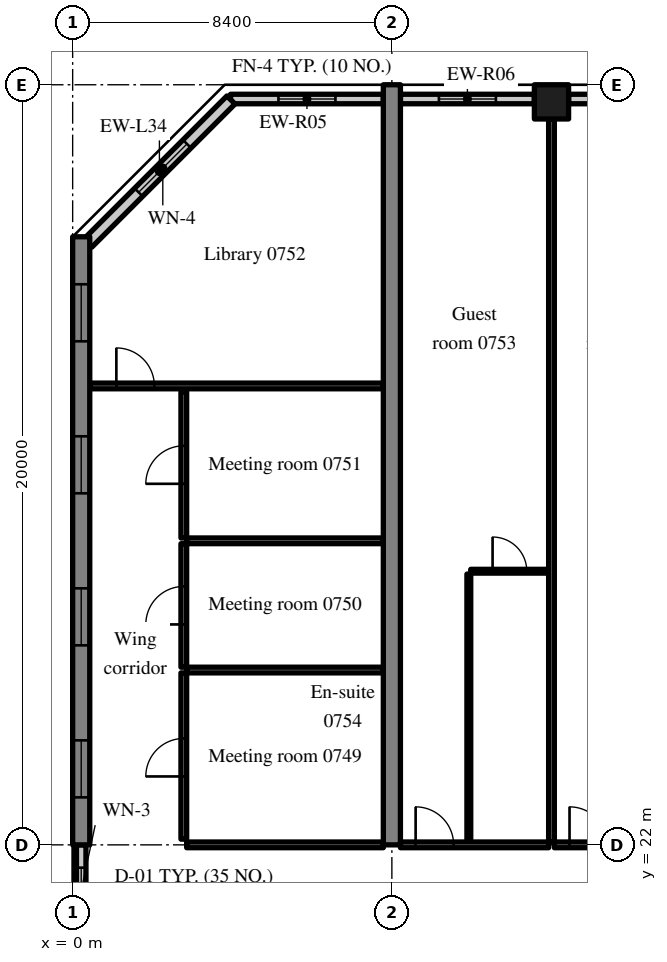
"""IFC4 building model, lengths in metres.
Left out: names, types, materials, properties, quantities, classifications, styles, units other than length and angle.
Written with IfcOpenShell. Run it as: python <this file> out.ifc"""

import sys

from ifc_helpers import new_model, si_unit, direction, frame, frame_2d, origin, origin_2d, place, context, subcontext, project, spatial, rectangle, extrude, source, transform, mapped, element, fill, save


model = new_model("IFC4")
c1 = context("Model", 3, precision=1e-05, world=origin(), true_north=direction((0.0, 1.0)))
c2 = subcontext(c1, "Body", "Model", "MODEL_VIEW")
j1 = project(units=[si_unit("LENGTHUNIT", "METRE"), si_unit("PLANEANGLEUNIT", "RADIAN")], contexts=[c1])
p1 = place(None, origin())
s1 = spatial("IfcSite", under=j1, at=p1, CompositionType="ELEMENT")
p2 = place(p1, origin())
s2 = spatial("IfcBuilding", under=s1, at=p2, CompositionType="ELEMENT")
p3 = place(p2, frame((0.0, 0.0, 35.4)))
s3 = spatial("IfcBuildingStorey", under=s2, at=p3, CompositionType="ELEMENT", Elevation=35.4)
m1 = source(origin(), c2, "Body", "SweptSolid", [
    extrude(rectangle(XDim=16.0, YDim=0.45, at=frame_2d((8.0, 0.0))), origin(), (0.0, 0.0, 1.0), 3.52),
])
p4 = place(p3, frame((0.225, 22.0, 0.0), z_axis=(0.0, 0.0, 1.0), x_axis=(0.0, 1.0, 0.0)))
e1 = element("IfcWall", 1, at=p4, inside=s3, PredefinedType="SHEAR", context=c2, shape_type="MappedRepresentation", body=[
    mapped(m1, transform((0.0, 0.0, 0.0), scale=1.0)),
])
m2 = source(origin(), c2, "Body", "SweptSolid", [
    extrude(rectangle(XDim=1.5, YDim=1.5, at=frame_2d((0.75, 0.75))), frame((0.0, 0.235, 0.0), z_axis=(0.0, -1.0, 0.0), x_axis=(1.0, 0.0, 0.0)), (0.0, 0.0, 1.0), 0.47),
])
p5 = place(p4, frame((1.25, 0.0, 0.9)))
e2 = element("IfcOpeningElement", 2, at=p5, cuts=e1, PredefinedType="OPENING", context=c2, shape_type="MappedRepresentation", body=[
    mapped(m2, transform((0.0, 0.0, 0.0), scale=1.0)),
])
p6 = place(p4, frame((5.25, 0.0, 0.9)))
e3 = element("IfcOpeningElement", 3, at=p6, cuts=e1, PredefinedType="OPENING", context=c2, shape_type="MappedRepresentation", body=[
    mapped(m2, transform((0.0, 0.0, 0.0), scale=1.0)),
])
p7 = place(p4, frame((9.25, 0.0, 0.9)))
e4 = element("IfcOpeningElement", 4, at=p7, cuts=e1, PredefinedType="OPENING", context=c2, shape_type="MappedRepresentation", body=[
    mapped(m2, transform((0.0, 0.0, 0.0), scale=1.0)),
])
p8 = place(p4, frame((13.25, 0.0, 0.9)))
e5 = element("IfcOpeningElement", 5, at=p8, cuts=e1, PredefinedType="OPENING", context=c2, shape_type="MappedRepresentation", body=[
    mapped(m2, transform((0.0, 0.0, 0.0), scale=1.0)),
])
m3 = source(origin(), c2, "Body", "SweptSolid", [
    extrude(rectangle(XDim=20.0, YDim=0.45, at=frame_2d((10.0, 0.0))), origin(), (0.0, 0.0, 1.0), 3.52),
])
p9 = place(p3, frame((8.4, 22.0, 0.0), z_axis=(0.0, 0.0, 1.0), x_axis=(0.0, 1.0, 0.0)))
e6 = element("IfcWall", 6, at=p9, inside=s3, PredefinedType="SHEAR", context=c2, shape_type="MappedRepresentation", body=[
    mapped(m3, transform((0.0, 0.0, 0.0), scale=1.0)),
])
m4 = source(origin(), c2, "Body", "SweptSolid", [
    extrude(rectangle(XDim=0.9, YDim=0.9, at=origin_2d()), origin(), (0.0, 0.0, 1.0), 3.52),
])
p10 = place(p3, frame((12.6, 41.55, 0.0), z_axis=(0.0, 0.0, 1.0), x_axis=(1.0, 0.0, 0.0)))
e7 = element("IfcColumn", 7, at=p10, inside=s3, PredefinedType="COLUMN", context=c2, shape_type="MappedRepresentation", body=[
    mapped(m4, transform((0.0, 0.0, 0.0), scale=1.0)),
])
m5 = source(origin(), c2, "Body", "SweptSolid", [
    extrude(rectangle(XDim=4.02, YDim=0.25, at=frame_2d((2.01, 0.0))), origin(), (0.0, 0.0, 1.0), 2.77),
])
p11 = place(p3, frame((8.175, 41.625, 0.0), z_axis=(0.0, 0.0, 1.0), x_axis=(-1.0, 0.0, 0.0)))
e8 = element("IfcWall", 8, at=p11, inside=s3, PredefinedType="SOLIDWALL", context=c2, shape_type="MappedRepresentation", body=[
    mapped(m5, transform((0.0, 0.0, 0.0), scale=1.0)),
])
m6 = source(origin(), c2, "Body", "SweptSolid", [
    extrude(rectangle(XDim=1.5, YDim=1.5, at=frame_2d((0.75, 0.75))), frame((0.0, 0.135, 0.0), z_axis=(0.0, -1.0, 0.0), x_axis=(1.0, 0.0, 0.0)), (0.0, 0.0, 1.0), 0.27),
])
p12 = place(p11, frame((1.26, 0.0, 0.9)))
e9 = element("IfcOpeningElement", 9, at=p12, cuts=e8, PredefinedType="OPENING", context=c2, shape_type="MappedRepresentation", body=[
    mapped(m6, transform((0.0, 0.0, 0.0), scale=1.0)),
])
m7 = source(origin(), c2, "Body", "SweptSolid", [
    extrude(rectangle(XDim=3.525, YDim=0.25, at=frame_2d((1.762, 0.0))), origin(), (0.0, 0.0, 1.0), 2.77),
])
p13 = place(p3, frame((12.15, 41.625, 0.0), z_axis=(0.0, 0.0, 1.0), x_axis=(-1.0, 0.0, 0.0)))
e10 = element("IfcWall", 10, at=p13, inside=s3, PredefinedType="SOLIDWALL", context=c2, shape_type="MappedRepresentation", body=[
    mapped(m7, transform((0.0, 0.0, 0.0), scale=1.0)),
])
p14 = place(p13, frame((1.012, 0.0, 0.9)))
e11 = element("IfcOpeningElement", 11, at=p14, cuts=e10, PredefinedType="OPENING", context=c2, shape_type="MappedRepresentation", body=[
    mapped(m6, transform((0.0, 0.0, 0.0), scale=1.0)),
])
p15 = place(p3, frame((16.575, 41.625, 0.0), z_axis=(0.0, 0.0, 1.0), x_axis=(-1.0, 0.0, 0.0)))
e12 = element("IfcWall", 12, at=p15, inside=s3, PredefinedType="SOLIDWALL", context=c2, shape_type="MappedRepresentation", body=[
    mapped(m7, transform((0.0, 0.0, 0.0), scale=1.0)),
])
p16 = place(p15, frame((1.012, 0.0, 0.9)))
e13 = element("IfcOpeningElement", 13, at=p16, cuts=e12, PredefinedType="OPENING", context=c2, shape_type="MappedRepresentation", body=[
    mapped(m6, transform((0.0, 0.0, 0.0), scale=1.0)),
])
m8 = source(origin(), c2, "Body", "SweptSolid", [
    extrude(rectangle(XDim=5.326, YDim=0.3, at=frame_2d((2.663, 0.0))), origin(), (0.0, 0.0, 1.0), 3.52),
])
p17 = place(p3, frame((4.166, 41.6, 0.0), z_axis=(0.0, 0.0, 1.0), x_axis=(-0.707106781187, -0.707106781187, 0.0)))
e14 = element("IfcWall", 14, at=p17, inside=s3, PredefinedType="SOLIDWALL", context=c2, shape_type="MappedRepresentation", body=[
    mapped(m8, transform((0.0, 0.0, 0.0), scale=1.0)),
])
m9 = source(origin(), c2, "Body", "SweptSolid", [
    extrude(rectangle(XDim=1.8, YDim=1.5, at=frame_2d((0.9, 0.75))), frame((0.0, 0.16, 0.0), z_axis=(0.0, -1.0, 0.0), x_axis=(1.0, 0.0, 0.0)), (0.0, 0.0, 1.0), 0.32),
])
p18 = place(p17, frame((1.636, 0.0, 0.9)))
e15 = element("IfcOpeningElement", 15, at=p18, cuts=e14, PredefinedType="OPENING", context=c2, shape_type="MappedRepresentation", body=[
    mapped(m9, transform((0.0, 0.0, 0.0), scale=1.0)),
])
m10 = source(origin(), c2, "Body", "SweptSolid", [
    extrude(rectangle(XDim=2.4, YDim=0.25, at=frame_2d((1.2, 0.0))), origin(), (0.0, 0.0, 1.0), 2.62),
])
p19 = place(p3, frame((0.225, 19.6, 0.0), z_axis=(0.0, 0.0, 1.0), x_axis=(0.0, 1.0, 0.0)))
e16 = element("IfcWall", 16, at=p19, inside=s3, PredefinedType="SOLIDWALL", context=c2, shape_type="MappedRepresentation", body=[
    mapped(m10, transform((0.0, 0.0, 0.0), scale=1.0)),
])
m11 = source(origin(), c2, "Body", "SweptSolid", [
    extrude(rectangle(XDim=1.2, YDim=1.5, at=frame_2d((0.6, 0.75))), frame((0.0, 0.135, 0.0), z_axis=(0.0, -1.0, 0.0), x_axis=(1.0, 0.0, 0.0)), (0.0, 0.0, 1.0), 0.27),
])
p20 = place(p19, frame((0.6, 0.0, 0.9)))
e17 = element("IfcOpeningElement", 17, at=p20, cuts=e16, PredefinedType="OPENING", context=c2, shape_type="MappedRepresentation", body=[
    mapped(m11, transform((0.0, 0.0, 0.0), scale=1.0)),
])
m12 = source(origin(), c2, "Body", "SweptSolid", [
    extrude(rectangle(XDim=5.175, YDim=0.15, at=frame_2d((2.587, 0.0))), origin(), (0.0, 0.0, 1.0), 2.82),
])
p21 = place(p3, frame((3.0, 22.0, 0.0), z_axis=(0.0, 0.0, 1.0), x_axis=(1.0, 0.0, 0.0)))
e18 = element("IfcWall", 18, at=p21, inside=s3, PredefinedType="PARTITIONING", context=c2, shape_type="MappedRepresentation", body=[
    mapped(m12, transform((0.0, 0.0, 0.0), scale=1.0)),
])
m13 = source(origin(), c2, "Body", "SweptSolid", [
    extrude(rectangle(XDim=4.375, YDim=0.15, at=frame_2d((2.188, 0.0))), origin(), (0.0, 0.0, 1.0), 3.52),
])
p22 = place(p3, frame((2.925, 22.15, 0.0), z_axis=(0.0, 0.0, 1.0), x_axis=(0.0, 1.0, 0.0)))
e19 = element("IfcWall", 19, at=p22, inside=s3, PredefinedType="PARTITIONING", context=c2, shape_type="MappedRepresentation", body=[
    mapped(m13, transform((0.0, 0.0, 0.0), scale=1.0)),
])
m14 = source(origin(), c2, "Body", "SweptSolid", [
    extrude(rectangle(XDim=1.0, YDim=2.1, at=frame_2d((0.5, 1.05))), frame((0.0, 0.085, 0.0), z_axis=(0.0, -1.0, 0.0), x_axis=(1.0, 0.0, 0.0)), (0.0, 0.0, 1.0), 0.17),
])
p23 = place(p22, frame((1.65, 0.0, 0.0)))
e20 = element("IfcOpeningElement", 20, at=p23, cuts=e19, PredefinedType="OPENING", context=c2, shape_type="MappedRepresentation", body=[
    mapped(m14, transform((0.0, 0.0, 0.0), scale=1.0)),
])
m15 = source(origin(), c2, "Body", "SweptSolid", [
    extrude(rectangle(XDim=5.175, YDim=0.15, at=frame_2d((2.587, 0.0))), origin(), (0.0, 0.0, 1.0), 3.52),
])
p24 = place(p3, frame((3.0, 26.6, 0.0), z_axis=(0.0, 0.0, 1.0), x_axis=(1.0, 0.0, 0.0)))
e21 = element("IfcWall", 21, at=p24, inside=s3, PredefinedType="PARTITIONING", context=c2, shape_type="MappedRepresentation", body=[
    mapped(m15, transform((0.0, 0.0, 0.0), scale=1.0)),
])
m16 = source(origin(), c2, "Body", "SweptSolid", [
    extrude(rectangle(XDim=3.25, YDim=0.15, at=frame_2d((1.625, 0.0))), origin(), (0.0, 0.0, 1.0), 3.52),
])
p25 = place(p3, frame((2.925, 26.675, 0.0), z_axis=(0.0, 0.0, 1.0), x_axis=(0.0, 1.0, 0.0)))
e22 = element("IfcWall", 22, at=p25, inside=s3, PredefinedType="PARTITIONING", context=c2, shape_type="MappedRepresentation", body=[
    mapped(m16, transform((0.0, 0.0, 0.0), scale=1.0)),
])
p26 = place(p25, frame((1.125, 0.0, 0.0)))
e23 = element("IfcOpeningElement", 23, at=p26, cuts=e22, PredefinedType="OPENING", context=c2, shape_type="MappedRepresentation", body=[
    mapped(m14, transform((0.0, 0.0, 0.0), scale=1.0)),
])
p27 = place(p3, frame((3.0, 30.0, 0.0), z_axis=(0.0, 0.0, 1.0), x_axis=(1.0, 0.0, 0.0)))
e24 = element("IfcWall", 24, at=p27, inside=s3, PredefinedType="PARTITIONING", context=c2, shape_type="MappedRepresentation", body=[
    mapped(m15, transform((0.0, 0.0, 0.0), scale=1.0)),
])
m17 = source(origin(), c2, "Body", "SweptSolid", [
    extrude(rectangle(XDim=3.85, YDim=0.15, at=frame_2d((1.925, 0.0))), origin(), (0.0, 0.0, 1.0), 3.52),
])
p28 = place(p3, frame((2.925, 30.075, 0.0), z_axis=(0.0, 0.0, 1.0), x_axis=(0.0, 1.0, 0.0)))
e25 = element("IfcWall", 25, at=p28, inside=s3, PredefinedType="PARTITIONING", context=c2, shape_type="MappedRepresentation", body=[
    mapped(m17, transform((0.0, 0.0, 0.0), scale=1.0)),
])
p29 = place(p28, frame((1.425, 0.0, 0.0)))
e26 = element("IfcOpeningElement", 26, at=p29, cuts=e25, PredefinedType="OPENING", context=c2, shape_type="MappedRepresentation", body=[
    mapped(m14, transform((0.0, 0.0, 0.0), scale=1.0)),
])
m18 = source(origin(), c2, "Body", "SweptSolid", [
    extrude(rectangle(XDim=7.725, YDim=0.15, at=frame_2d((3.863, 0.0))), origin(), (0.0, 0.0, 1.0), 3.52),
])
p30 = place(p3, frame((0.45, 34.075, 0.0), z_axis=(0.0, 0.0, 1.0), x_axis=(1.0, 0.0, 0.0)))
e27 = element("IfcWall", 27, at=p30, inside=s3, PredefinedType="PARTITIONING", context=c2, shape_type="MappedRepresentation", body=[
    mapped(m18, transform((0.0, 0.0, 0.0), scale=1.0)),
])
p31 = place(p30, frame((0.7, 0.0, 0.0)))
e28 = element("IfcOpeningElement", 28, at=p31, cuts=e27, PredefinedType="OPENING", context=c2, shape_type="MappedRepresentation", body=[
    mapped(m14, transform((0.0, 0.0, 0.0), scale=1.0)),
])
m19 = source(origin(), c2, "Body", "SweptSolid", [
    extrude(rectangle(XDim=7.05, YDim=0.1, at=frame_2d((3.525, 0.0))), origin(), (0.0, 0.0, 1.0), 3.52),
])
p32 = place(p3, frame((10.425, 22.075, 0.0), z_axis=(0.0, 0.0, 1.0), x_axis=(0.0, 1.0, 0.0)))
e29 = element("IfcWall", 29, at=p32, inside=s3, PredefinedType="PARTITIONING", context=c2, shape_type="MappedRepresentation", body=[
    mapped(m19, transform((0.0, 0.0, 0.0), scale=1.0)),
])
m20 = source(origin(), c2, "Body", "SweptSolid", [
    extrude(rectangle(XDim=2.05, YDim=0.1, at=frame_2d((1.025, 0.0))), origin(), (0.0, 0.0, 1.0), 3.52),
])
p33 = place(p3, frame((10.475, 29.2, 0.0), z_axis=(0.0, 0.0, 1.0), x_axis=(1.0, 0.0, 0.0)))
e30 = element("IfcWall", 30, at=p33, inside=s3, PredefinedType="PARTITIONING", context=c2, shape_type="MappedRepresentation", body=[
    mapped(m20, transform((0.0, 0.0, 0.0), scale=1.0)),
])
m21 = source(origin(), c2, "Body", "SweptSolid", [
    extrude(rectangle(XDim=0.9, YDim=2.1, at=frame_2d((0.45, 1.05))), frame((0.0, 0.06, 0.0), z_axis=(0.0, -1.0, 0.0), x_axis=(1.0, 0.0, 0.0)), (0.0, 0.0, 1.0), 0.12),
])
p34 = place(p33, frame((0.575, 0.0, 0.0)))
e31 = element("IfcOpeningElement", 31, at=p34, cuts=e30, PredefinedType="OPENING", context=c2, shape_type="MappedRepresentation", body=[
    mapped(m21, transform((0.0, 0.0, 0.0), scale=1.0)),
])
m22 = source(origin(), c2, "Body", "SweptSolid", [
    extrude(rectangle(XDim=3.9, YDim=0.15, at=frame_2d((1.95, 0.0))), origin(), (0.0, 0.0, 1.0), 2.82),
])
p35 = place(p3, frame((8.625, 22.0, 0.0), z_axis=(0.0, 0.0, 1.0), x_axis=(1.0, 0.0, 0.0)))
e32 = element("IfcWall", 32, at=p35, inside=s3, PredefinedType="PARTITIONING", context=c2, shape_type="MappedRepresentation", body=[
    mapped(m22, transform((0.0, 0.0, 0.0), scale=1.0)),
])
p36 = place(p35, frame((0.4, 0.0, 0.0)))
e33 = element("IfcOpeningElement", 33, at=p36, cuts=e32, PredefinedType="OPENING", context=c2, shape_type="MappedRepresentation", body=[
    mapped(m14, transform((0.0, 0.0, 0.0), scale=1.0)),
])
p37 = place(p3, frame((12.675, 22.0, 0.0), z_axis=(0.0, 0.0, 1.0), x_axis=(1.0, 0.0, 0.0)))
e34 = element("IfcWall", 34, at=p37, inside=s3, PredefinedType="PARTITIONING", context=c2, shape_type="MappedRepresentation", body=[
    mapped(m22, transform((0.0, 0.0, 0.0), scale=1.0)),
])
p38 = place(p37, frame((0.4, 0.0, 0.0)))
e35 = element("IfcOpeningElement", 35, at=p38, cuts=e34, PredefinedType="OPENING", context=c2, shape_type="MappedRepresentation", body=[
    mapped(m14, transform((0.0, 0.0, 0.0), scale=1.0)),
])
m23 = source(origin(), c2, "Body", "SweptSolid", [
    extrude(rectangle(XDim=19.025, YDim=0.15, at=frame_2d((9.513, 0.0))), origin(), (0.0, 0.0, 1.0), 3.52),
])
p39 = place(p3, frame((12.6, 22.075, 0.0), z_axis=(0.0, 0.0, 1.0), x_axis=(0.0, 1.0, 0.0)))
e36 = element("IfcWall", 36, at=p39, inside=s3, PredefinedType="PARTITIONING", context=c2, shape_type="MappedRepresentation", body=[
    mapped(m23, transform((0.0, 0.0, 0.0), scale=1.0)),
])
m24 = source(origin(), c2, "Body", "SweptSolid", [
    extrude(rectangle(XDim=1.5, YDim=1.5, at=frame_2d((0.75, 0.75))), frame((0.0, 0.03, 0.0), z_axis=(0.0, -1.0, 0.0), x_axis=(1.0, 0.0, 0.0)), (0.0, 0.0, 1.0), 0.06),
])
p40 = place(p12, origin())
e37 = element("IfcWindow", 37, at=p40, inside=s3, PartitioningType="SINGLE_PANEL", PredefinedType="WINDOW", context=c2, shape_type="MappedRepresentation", body=[
    mapped(m24, transform((0.0, 0.0, 0.0), scale=1.0)),
])
fill(e9, e37)
p41 = place(p14, origin())
e38 = element("IfcWindow", 38, at=p41, inside=s3, PartitioningType="SINGLE_PANEL", PredefinedType="WINDOW", context=c2, shape_type="MappedRepresentation", body=[
    mapped(m24, transform((0.0, 0.0, 0.0), scale=1.0)),
])
fill(e11, e38)
m25 = source(origin(), c2, "Body", "SweptSolid", [
    extrude(rectangle(XDim=1.8, YDim=1.5, at=frame_2d((0.9, 0.75))), frame((0.0, 0.03, 0.0), z_axis=(0.0, -1.0, 0.0), x_axis=(1.0, 0.0, 0.0)), (0.0, 0.0, 1.0), 0.06),
])
p42 = place(p18, origin())
e39 = element("IfcWindow", 39, at=p42, inside=s3, PartitioningType="SINGLE_PANEL", PredefinedType="WINDOW", context=c2, shape_type="MappedRepresentation", body=[
    mapped(m25, transform((0.0, 0.0, 0.0), scale=1.0)),
])
fill(e15, e39)
p43 = place(p5, origin())
e40 = element("IfcWindow", 40, at=p43, inside=s3, PartitioningType="SINGLE_PANEL", PredefinedType="WINDOW", context=c2, shape_type="MappedRepresentation", body=[
    mapped(m24, transform((0.0, 0.0, 0.0), scale=1.0)),
])
fill(e2, e40)
p44 = place(p6, origin())
e41 = element("IfcWindow", 41, at=p44, inside=s3, PartitioningType="SINGLE_PANEL", PredefinedType="WINDOW", context=c2, shape_type="MappedRepresentation", body=[
    mapped(m24, transform((0.0, 0.0, 0.0), scale=1.0)),
])
fill(e3, e41)
p45 = place(p7, origin())
e42 = element("IfcWindow", 42, at=p45, inside=s3, PartitioningType="SINGLE_PANEL", PredefinedType="WINDOW", context=c2, shape_type="MappedRepresentation", body=[
    mapped(m24, transform((0.0, 0.0, 0.0), scale=1.0)),
])
fill(e4, e42)
p46 = place(p8, origin())
e43 = element("IfcWindow", 43, at=p46, inside=s3, PartitioningType="SINGLE_PANEL", PredefinedType="WINDOW", context=c2, shape_type="MappedRepresentation", body=[
    mapped(m24, transform((0.0, 0.0, 0.0), scale=1.0)),
])
fill(e5, e43)
m26 = source(origin(), c2, "Body", "SweptSolid", [
    extrude(rectangle(XDim=1.2, YDim=1.5, at=frame_2d((0.6, 0.75))), frame((0.0, 0.03, 0.0), z_axis=(0.0, -1.0, 0.0), x_axis=(1.0, 0.0, 0.0)), (0.0, 0.0, 1.0), 0.06),
])
p47 = place(p20, origin())
e44 = element("IfcWindow", 44, at=p47, inside=s3, PartitioningType="SINGLE_PANEL", PredefinedType="WINDOW", context=c2, shape_type="MappedRepresentation", body=[
    mapped(m26, transform((0.0, 0.0, 0.0), scale=1.0)),
])
fill(e17, e44)
m27 = source(origin(), c2, "Body", "SweptSolid", [
    extrude(rectangle(XDim=1.0, YDim=2.1, at=frame_2d((0.5, 1.05))), frame((0.0, 0.025, 0.0), z_axis=(0.0, -1.0, 0.0), x_axis=(1.0, 0.0, 0.0)), (0.0, 0.0, 1.0), 0.05),
])
p48 = place(p23, origin())
e45 = element("IfcDoor", 45, at=p48, inside=s3, OperationType="SINGLE_SWING_LEFT", PredefinedType="DOOR", context=c2, shape_type="MappedRepresentation", body=[
    mapped(m27, transform((0.0, 0.0, 0.0), scale=1.0)),
])
fill(e20, e45)
p49 = place(p26, origin())
e46 = element("IfcDoor", 46, at=p49, inside=s3, OperationType="SINGLE_SWING_LEFT", PredefinedType="DOOR", context=c2, shape_type="MappedRepresentation", body=[
    mapped(m27, transform((0.0, 0.0, 0.0), scale=1.0)),
])
fill(e23, e46)
p50 = place(p29, origin())
e47 = element("IfcDoor", 47, at=p50, inside=s3, OperationType="SINGLE_SWING_LEFT", PredefinedType="DOOR", context=c2, shape_type="MappedRepresentation", body=[
    mapped(m27, transform((0.0, 0.0, 0.0), scale=1.0)),
])
fill(e26, e47)
p51 = place(p31, origin())
e48 = element("IfcDoor", 48, at=p51, inside=s3, OperationType="SINGLE_SWING_LEFT", PredefinedType="DOOR", context=c2, shape_type="MappedRepresentation", body=[
    mapped(m27, transform((0.0, 0.0, 0.0), scale=1.0)),
])
fill(e28, e48)
m28 = source(origin(), c2, "Body", "SweptSolid", [
    extrude(rectangle(XDim=0.9, YDim=2.1, at=frame_2d((0.45, 1.05))), frame((0.0, 0.025, 0.0), z_axis=(0.0, -1.0, 0.0), x_axis=(1.0, 0.0, 0.0)), (0.0, 0.0, 1.0), 0.05),
])
p52 = place(p34, origin())
e49 = element("IfcDoor", 49, at=p52, inside=s3, OperationType="SINGLE_SWING_LEFT", PredefinedType="DOOR", context=c2, shape_type="MappedRepresentation", body=[
    mapped(m28, transform((0.0, 0.0, 0.0), scale=1.0)),
])
fill(e31, e49)
p53 = place(p36, origin())
e50 = element("IfcDoor", 50, at=p53, inside=s3, OperationType="SINGLE_SWING_LEFT", PredefinedType="DOOR", context=c2, shape_type="MappedRepresentation", body=[
    mapped(m27, transform((0.0, 0.0, 0.0), scale=1.0)),
])
fill(e33, e50)
p54 = place(p38, origin())
e51 = element("IfcDoor", 51, at=p54, inside=s3, OperationType="SINGLE_SWING_LEFT", PredefinedType="DOOR", context=c2, shape_type="MappedRepresentation", body=[
    mapped(m27, transform((0.0, 0.0, 0.0), scale=1.0)),
])
fill(e35, e51)
save(model, sys.argv[1])
